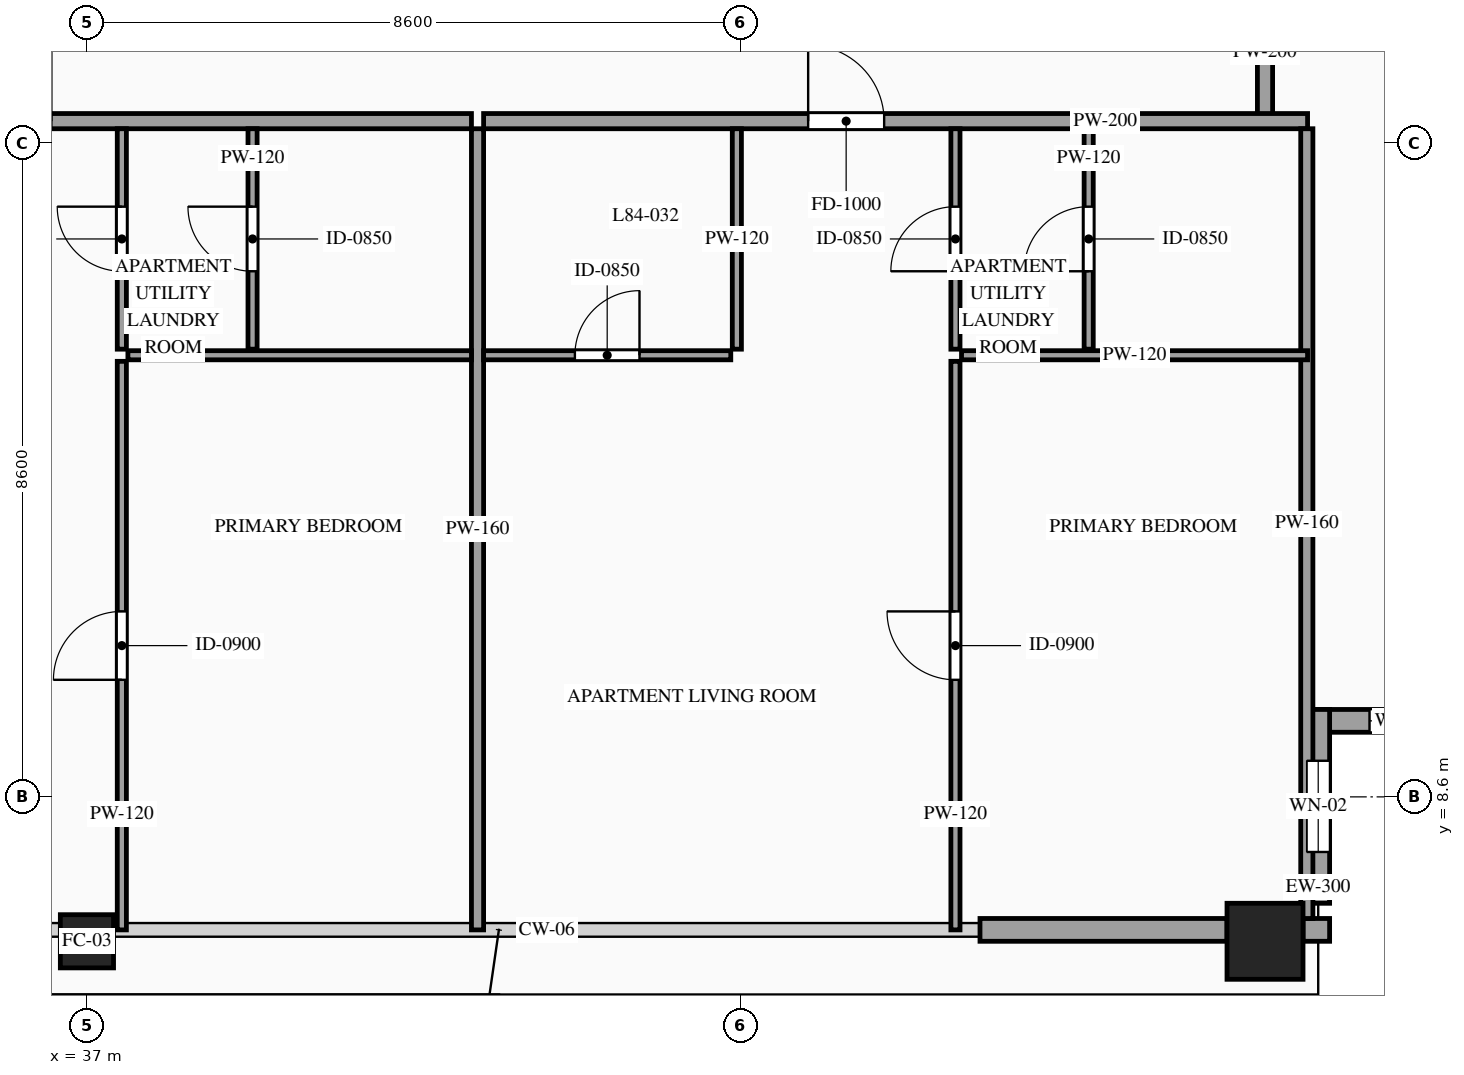
"""IFC4 building model, lengths in metres.
Left out: names, types, materials, properties, quantities, classifications, styles, units other than length and angle.
Written with IfcOpenShell. Run it as: python <this file> out.ifc"""

import sys

from ifc_helpers import new_model, si_unit, direction, frame, frame_2d, origin, origin_2d, place, context, subcontext, project, spatial, rectangle, hollow_rectangle, extrude, source, transform, mapped, element, fill, save


model = new_model("IFC4")
c1 = context("Model", 3, precision=1e-05, world=origin(), true_north=direction((0.0, 1.0)))
c2 = subcontext(c1, "Body", "Model", "MODEL_VIEW")
j1 = project(units=[si_unit("LENGTHUNIT", "METRE"), si_unit("PLANEANGLEUNIT", "RADIAN")], contexts=[c1])
p1 = place(None, origin())
s1 = spatial("IfcSite", under=j1, at=p1, CompositionType="ELEMENT")
p2 = place(p1, origin())
s2 = spatial("IfcBuilding", under=s1, at=p2, CompositionType="ELEMENT")
p3 = place(p2, frame((0.0, 0.0, 314.7)))
s3 = spatial("IfcBuildingStorey", under=s2, at=p3, CompositionType="ELEMENT", Elevation=314.7)
m1 = source(origin(), c2, "Body", "SweptSolid", [
    extrude(hollow_rectangle(XDim=0.7, YDim=0.7, WallThickness=0.032, at=origin_2d()), origin(), (0.0, 0.0, 1.0), 3.5),
])
p4 = place(p3, frame((37.0, 6.7, 0.0), z_axis=(0.0, 0.0, 1.0), x_axis=(1.0, 0.0, 0.0)))
e1 = element("IfcColumn", 1, at=p4, inside=s3, PredefinedType="COLUMN", context=c2, shape_type="MappedRepresentation", body=[
    mapped(m1, transform((0.0, 0.0, 0.0), scale=1.0)),
])
m2 = source(origin(), c2, "Body", "SweptSolid", [
    extrude(hollow_rectangle(XDim=1.0, YDim=1.0, WallThickness=0.048, at=origin_2d()), origin(), (0.0, 0.0, 1.0), 3.5),
])
p5 = place(p3, frame((52.5, 6.7, 0.0), z_axis=(0.0, 0.0, 1.0), x_axis=(1.0, 0.0, 0.0)))
e2 = element("IfcColumn", 2, at=p5, inside=s3, PredefinedType="COLUMN", context=c2, shape_type="MappedRepresentation", body=[
    mapped(m2, transform((0.0, 0.0, 0.0), scale=1.0)),
])
p6 = place(p3, frame((53.05, 9.6, 0.0), z_axis=(0.0, 0.0, 1.0), x_axis=(1.0, 0.0, 0.0)))
e3 = element("IfcWall", 3, at=p6, inside=s3, PredefinedType="SOLIDWALL", context=c2, shape_type="SweptSolid", body=[
    extrude(rectangle(XDim=2.55, YDim=0.3, at=frame_2d((1.275, 0.0))), origin(), (0.0, 0.0, 1.0), 3.28),
])
p7 = place(p6, frame((0.825, 0.0, 0.85)))
e4 = element("IfcOpeningElement", 4, at=p7, cuts=e3, PredefinedType="OPENING", context=c2, shape_type="SweptSolid", body=[
    extrude(rectangle(XDim=0.9, YDim=1.5, at=frame_2d((0.45, 0.75))), frame((0.0, 0.165, 0.0), z_axis=(0.0, -1.0, 0.0), x_axis=(1.0, 0.0, 0.0)), (0.0, 0.0, 1.0), 0.33),
])
p8 = place(p3, frame((53.2, 7.2, 0.0), z_axis=(0.0, 0.0, 1.0), x_axis=(0.0, 1.0, 0.0)))
e5 = element("IfcWall", 5, at=p8, inside=s3, PredefinedType="SOLIDWALL", context=c2, shape_type="SweptSolid", body=[
    extrude(rectangle(XDim=2.55, YDim=0.3, at=frame_2d((1.275, 0.0))), origin(), (0.0, 0.0, 1.0), 3.28),
])
p9 = place(p8, frame((0.675, 0.0, 0.85)))
e6 = element("IfcOpeningElement", 6, at=p9, cuts=e5, PredefinedType="OPENING", context=c2, shape_type="SweptSolid", body=[
    extrude(rectangle(XDim=1.2, YDim=2.1, at=frame_2d((0.6, 1.05))), frame((0.0, 0.165, 0.0), z_axis=(0.0, -1.0, 0.0), x_axis=(1.0, 0.0, 0.0)), (0.0, 0.0, 1.0), 0.33),
])
m3 = source(origin(), c2, "Body", "SweptSolid", [
    extrude(rectangle(XDim=0.35, YDim=0.3, at=frame_2d((0.175, 0.0))), origin(), (0.0, 0.0, 1.0), 3.28),
])
p10 = place(p3, frame((53.0, 6.85, 0.0), z_axis=(0.0, 0.0, 1.0), x_axis=(1.0, 0.0, 0.0)))
e7 = element("IfcWall", 7, at=p10, inside=s3, PredefinedType="SOLIDWALL", context=c2, shape_type="MappedRepresentation", body=[
    mapped(m3, transform((0.0, 0.0, 0.0), scale=1.0)),
])
m4 = source(origin(), c2, "Body", "SweptSolid", [
    extrude(rectangle(XDim=3.25, YDim=0.3, at=frame_2d((1.625, 0.0))), origin(), (0.0, 0.0, 1.0), 2.885),
])
p11 = place(p3, frame((48.75, 6.85, 0.0), z_axis=(0.0, 0.0, 1.0), x_axis=(1.0, 0.0, 0.0)))
e8 = element("IfcWall", 8, at=p11, inside=s3, PredefinedType="SOLIDWALL", context=c2, shape_type="MappedRepresentation", body=[
    mapped(m4, transform((0.0, 0.0, 0.0), scale=1.0)),
])
m5 = source(origin(), c2, "Body", "SweptSolid", [
    extrude(rectangle(XDim=1.7, YDim=0.2, at=frame_2d((0.85, 0.0))), origin(), (0.0, 0.0, 1.0), 3.28),
])
p12 = place(p3, frame((52.5, 17.55, 0.0), z_axis=(0.0, 0.0, 1.0), x_axis=(0.0, 1.0, 0.0)))
e9 = element("IfcWall", 9, at=p12, inside=s3, PredefinedType="PARTITIONING", context=c2, shape_type="MappedRepresentation", body=[
    mapped(m5, transform((0.0, 0.0, 0.0), scale=1.0)),
])
p13 = place(p3, frame((31.298, 17.49, 0.0), z_axis=(0.0, 0.0, 1.0), x_axis=(1.0, 0.0, 0.0)))
e10 = element("IfcWall", 10, at=p13, inside=s3, PredefinedType="PARTITIONING", context=c2, shape_type="SweptSolid", body=[
    extrude(rectangle(XDim=10.761, YDim=0.2, at=frame_2d((5.38, 0.0))), origin(), (0.0, 0.0, 1.0), 3.28),
])
p14 = place(p13, frame((4.234, 0.0, 0.0)))
e11 = element("IfcOpeningElement", 11, at=p14, cuts=e10, PredefinedType="OPENING", context=c2, shape_type="SweptSolid", body=[
    extrude(rectangle(XDim=1.0, YDim=2.2, at=frame_2d((0.5, 1.1))), frame((0.0, 0.115, 0.0), z_axis=(0.0, -1.0, 0.0), x_axis=(1.0, 0.0, 0.0)), (0.0, 0.0, 1.0), 0.23),
])
m6 = source(origin(), c2, "Body", "SweptSolid", [
    extrude(rectangle(XDim=10.54, YDim=0.16, at=frame_2d((5.27, 0.0))), origin(), (0.0, 0.0, 1.0), 3.28),
])
p15 = place(p3, frame((42.139, 6.85, 0.0), z_axis=(0.0, 0.0, 1.0), x_axis=(0.0, 1.0, 0.0)))
e12 = element("IfcWall", 12, at=p15, inside=s3, PredefinedType="PARTITIONING", context=c2, shape_type="MappedRepresentation", body=[
    mapped(m6, transform((0.0, 0.0, 0.0), scale=1.0)),
])
p16 = place(p3, frame((39.179, 14.49, 0.0), z_axis=(0.0, 0.0, 1.0), x_axis=(0.0, 1.0, 0.0)))
e13 = element("IfcWall", 13, at=p16, inside=s3, PredefinedType="PARTITIONING", context=c2, shape_type="SweptSolid", body=[
    extrude(rectangle(XDim=2.9, YDim=0.12, at=frame_2d((1.45, 0.0))), origin(), (0.0, 0.0, 1.0), 3.28),
])
p17 = place(p16, frame((1.025, 0.0, 0.0)))
e14 = element("IfcOpeningElement", 14, at=p17, cuts=e13, PredefinedType="OPENING", context=c2, shape_type="SweptSolid", body=[
    extrude(rectangle(XDim=0.85, YDim=2.1, at=frame_2d((0.425, 1.05))), frame((0.0, 0.075, 0.0), z_axis=(0.0, -1.0, 0.0), x_axis=(1.0, 0.0, 0.0)), (0.0, 0.0, 1.0), 0.15),
])
m7 = source(origin(), c2, "Body", "SweptSolid", [
    extrude(rectangle(XDim=4.52, YDim=0.12, at=frame_2d((2.26, 0.0))), origin(), (0.0, 0.0, 1.0), 3.28),
])
p18 = place(p3, frame((37.539, 14.41, 0.0), z_axis=(0.0, 0.0, 1.0), x_axis=(1.0, 0.0, 0.0)))
e15 = element("IfcWall", 15, at=p18, inside=s3, PredefinedType="PARTITIONING", context=c2, shape_type="MappedRepresentation", body=[
    mapped(m7, transform((0.0, 0.0, 0.0), scale=1.0)),
])
p19 = place(p3, frame((37.459, 6.85, 0.0), z_axis=(0.0, 0.0, 1.0), x_axis=(0.0, 1.0, 0.0)))
e16 = element("IfcWall", 16, at=p19, inside=s3, PredefinedType="PARTITIONING", context=c2, shape_type="SweptSolid", body=[
    extrude(rectangle(XDim=7.48, YDim=0.12, at=frame_2d((3.74, 0.0))), origin(), (0.0, 0.0, 1.0), 3.28),
])
p20 = place(p19, frame((3.29, 0.0, 0.0)))
e17 = element("IfcOpeningElement", 17, at=p20, cuts=e16, PredefinedType="OPENING", context=c2, shape_type="SweptSolid", body=[
    extrude(rectangle(XDim=0.9, YDim=2.15, at=frame_2d((0.45, 1.075))), frame((0.0, 0.075, 0.0), z_axis=(0.0, -1.0, 0.0), x_axis=(1.0, 0.0, 0.0)), (0.0, 0.0, 1.0), 0.15),
])
p21 = place(p3, frame((37.459, 14.49, 0.0), z_axis=(0.0, 0.0, 1.0), x_axis=(0.0, 1.0, 0.0)))
e18 = element("IfcWall", 18, at=p21, inside=s3, PredefinedType="PARTITIONING", context=c2, shape_type="SweptSolid", body=[
    extrude(rectangle(XDim=2.9, YDim=0.12, at=frame_2d((1.45, 0.0))), origin(), (0.0, 0.0, 1.0), 3.28),
])
p22 = place(p21, frame((1.025, 0.0, 0.0)))
e19 = element("IfcOpeningElement", 19, at=p22, cuts=e18, PredefinedType="OPENING", context=c2, shape_type="SweptSolid", body=[
    extrude(rectangle(XDim=0.85, YDim=2.1, at=frame_2d((0.425, 1.05))), frame((0.0, 0.075, 0.0), z_axis=(0.0, -1.0, 0.0), x_axis=(1.0, 0.0, 0.0)), (0.0, 0.0, 1.0), 0.15),
])
p23 = place(p3, frame((42.219, 17.49, 0.0), z_axis=(0.0, 0.0, 1.0), x_axis=(1.0, 0.0, 0.0)))
e20 = element("IfcWall", 20, at=p23, inside=s3, PredefinedType="PARTITIONING", context=c2, shape_type="SweptSolid", body=[
    extrude(rectangle(XDim=10.841, YDim=0.2, at=frame_2d((5.42, 0.0))), origin(), (0.0, 0.0, 1.0), 3.28),
])
p24 = place(p23, frame((4.27, 0.0, 0.0)))
e21 = element("IfcOpeningElement", 21, at=p24, cuts=e20, PredefinedType="OPENING", context=c2, shape_type="SweptSolid", body=[
    extrude(rectangle(XDim=1.0, YDim=2.2, at=frame_2d((0.5, 1.1))), frame((0.0, 0.115, 0.0), z_axis=(0.0, -1.0, 0.0), x_axis=(1.0, 0.0, 0.0)), (0.0, 0.0, 1.0), 0.23),
])
m8 = source(origin(), c2, "Body", "SweptSolid", [
    extrude(rectangle(XDim=10.39, YDim=0.16, at=frame_2d((5.195, 0.0))), origin(), (0.0, 0.0, 1.0), 3.28),
])
p25 = place(p3, frame((53.05, 7.0, 0.0), z_axis=(0.0, 0.0, 1.0), x_axis=(0.0, 1.0, 0.0)))
e22 = element("IfcWall", 22, at=p25, inside=s3, PredefinedType="PARTITIONING", context=c2, shape_type="MappedRepresentation", body=[
    mapped(m8, transform((0.0, 0.0, 0.0), scale=1.0)),
])
p26 = place(p3, frame((42.219, 14.41, 0.0), z_axis=(0.0, 0.0, 1.0), x_axis=(1.0, 0.0, 0.0)))
e23 = element("IfcWall", 23, at=p26, inside=s3, PredefinedType="PARTITIONING", context=c2, shape_type="SweptSolid", body=[
    extrude(rectangle(XDim=3.252, YDim=0.12, at=frame_2d((1.626, 0.0))), origin(), (0.0, 0.0, 1.0), 3.28),
])
p27 = place(p26, frame((1.201, 0.0, 0.0)))
e24 = element("IfcOpeningElement", 24, at=p27, cuts=e23, PredefinedType="OPENING", context=c2, shape_type="SweptSolid", body=[
    extrude(rectangle(XDim=0.85, YDim=2.1, at=frame_2d((0.425, 1.05))), frame((0.0, 0.075, 0.0), z_axis=(0.0, -1.0, 0.0), x_axis=(1.0, 0.0, 0.0)), (0.0, 0.0, 1.0), 0.15),
])
m9 = source(origin(), c2, "Body", "SweptSolid", [
    extrude(rectangle(XDim=2.9, YDim=0.12, at=frame_2d((1.45, 0.0))), origin(), (0.0, 0.0, 1.0), 3.28),
])
p28 = place(p3, frame((45.551, 14.49, 0.0), z_axis=(0.0, 0.0, 1.0), x_axis=(0.0, 1.0, 0.0)))
e25 = element("IfcWall", 25, at=p28, inside=s3, PredefinedType="PARTITIONING", context=c2, shape_type="MappedRepresentation", body=[
    mapped(m9, transform((0.0, 0.0, 0.0), scale=1.0)),
])
p29 = place(p3, frame((50.18, 14.49, 0.0), z_axis=(0.0, 0.0, 1.0), x_axis=(0.0, 1.0, 0.0)))
e26 = element("IfcWall", 26, at=p29, inside=s3, PredefinedType="PARTITIONING", context=c2, shape_type="SweptSolid", body=[
    extrude(rectangle(XDim=2.9, YDim=0.12, at=frame_2d((1.45, 0.0))), origin(), (0.0, 0.0, 1.0), 2.825),
])
p30 = place(p29, frame((1.025, 0.0, 0.0)))
e27 = element("IfcOpeningElement", 27, at=p30, cuts=e26, PredefinedType="OPENING", context=c2, shape_type="SweptSolid", body=[
    extrude(rectangle(XDim=0.85, YDim=2.1, at=frame_2d((0.425, 1.05))), frame((0.0, 0.075, 0.0), z_axis=(0.0, -1.0, 0.0), x_axis=(1.0, 0.0, 0.0)), (0.0, 0.0, 1.0), 0.15),
])
m10 = source(origin(), c2, "Body", "SweptSolid", [
    extrude(rectangle(XDim=4.553, YDim=0.12, at=frame_2d((2.276, 0.0))), origin(), (0.0, 0.0, 1.0), 3.28),
])
p31 = place(p3, frame((48.507, 14.41, 0.0), z_axis=(0.0, 0.0, 1.0), x_axis=(1.0, 0.0, 0.0)))
e28 = element("IfcWall", 28, at=p31, inside=s3, PredefinedType="PARTITIONING", context=c2, shape_type="MappedRepresentation", body=[
    mapped(m10, transform((0.0, 0.0, 0.0), scale=1.0)),
])
p32 = place(p3, frame((48.427, 6.85, 0.0), z_axis=(0.0, 0.0, 1.0), x_axis=(0.0, 1.0, 0.0)))
e29 = element("IfcWall", 29, at=p32, inside=s3, PredefinedType="PARTITIONING", context=c2, shape_type="SweptSolid", body=[
    extrude(rectangle(XDim=7.48, YDim=0.12, at=frame_2d((3.74, 0.0))), origin(), (0.0, 0.0, 1.0), 3.28),
])
p33 = place(p32, frame((3.29, 0.0, 0.0)))
e30 = element("IfcOpeningElement", 30, at=p33, cuts=e29, PredefinedType="OPENING", context=c2, shape_type="SweptSolid", body=[
    extrude(rectangle(XDim=0.9, YDim=2.15, at=frame_2d((0.45, 1.075))), frame((0.0, 0.075, 0.0), z_axis=(0.0, -1.0, 0.0), x_axis=(1.0, 0.0, 0.0)), (0.0, 0.0, 1.0), 0.15),
])
p34 = place(p3, frame((48.427, 14.49, 0.0), z_axis=(0.0, 0.0, 1.0), x_axis=(0.0, 1.0, 0.0)))
e31 = element("IfcWall", 31, at=p34, inside=s3, PredefinedType="PARTITIONING", context=c2, shape_type="SweptSolid", body=[
    extrude(rectangle(XDim=2.9, YDim=0.12, at=frame_2d((1.45, 0.0))), origin(), (0.0, 0.0, 1.0), 3.28),
])
p35 = place(p34, frame((1.025, 0.0, 0.0)))
e32 = element("IfcOpeningElement", 32, at=p35, cuts=e31, PredefinedType="OPENING", context=c2, shape_type="SweptSolid", body=[
    extrude(rectangle(XDim=0.85, YDim=2.1, at=frame_2d((0.425, 1.05))), frame((0.0, 0.075, 0.0), z_axis=(0.0, -1.0, 0.0), x_axis=(1.0, 0.0, 0.0)), (0.0, 0.0, 1.0), 0.15),
])
m11 = source(origin(), c2, "Body", "SweptSolid", [
    extrude(rectangle(XDim=0.9, YDim=1.5, at=frame_2d((0.45, 0.75))), frame((0.0, 0.03, 0.0), z_axis=(0.0, -1.0, 0.0), x_axis=(1.0, 0.0, 0.0)), (0.0, 0.0, 1.0), 0.06),
])
p36 = place(p7, origin())
e33 = element("IfcWindow", 33, at=p36, inside=s3, PartitioningType="SINGLE_PANEL", PredefinedType="WINDOW", context=c2, shape_type="MappedRepresentation", body=[
    mapped(m11, transform((0.0, 0.0, 0.0), scale=1.0)),
])
fill(e4, e33)
m12 = source(origin(), c2, "Body", "SweptSolid", [
    extrude(rectangle(XDim=1.2, YDim=2.1, at=frame_2d((0.6, 1.05))), frame((0.0, 0.03, 0.0), z_axis=(0.0, -1.0, 0.0), x_axis=(1.0, 0.0, 0.0)), (0.0, 0.0, 1.0), 0.06),
])
p37 = place(p9, origin())
e34 = element("IfcWindow", 34, at=p37, inside=s3, PartitioningType="SINGLE_PANEL", PredefinedType="WINDOW", context=c2, shape_type="MappedRepresentation", body=[
    mapped(m12, transform((0.0, 0.0, 0.0), scale=1.0)),
])
fill(e6, e34)
m13 = source(origin(), c2, "Body", "SweptSolid", [
    extrude(rectangle(XDim=0.85, YDim=2.1, at=frame_2d((0.425, 1.05))), frame((0.0, 0.025, 0.0), z_axis=(0.0, -1.0, 0.0), x_axis=(1.0, 0.0, 0.0)), (0.0, 0.0, 1.0), 0.05),
])
p38 = place(p17, origin())
e35 = element("IfcDoor", 35, at=p38, inside=s3, OperationType="SINGLE_SWING_RIGHT", PredefinedType="DOOR", context=c2, shape_type="MappedRepresentation", body=[
    mapped(m13, transform((0.0, 0.0, 0.0), scale=1.0)),
])
fill(e14, e35)
m14 = source(origin(), c2, "Body", "SweptSolid", [
    extrude(rectangle(XDim=0.9, YDim=2.15, at=frame_2d((0.45, 1.075))), frame((0.0, 0.025, 0.0), z_axis=(0.0, -1.0, 0.0), x_axis=(1.0, 0.0, 0.0)), (0.0, 0.0, 1.0), 0.05),
])
p39 = place(p20, origin())
e36 = element("IfcDoor", 36, at=p39, inside=s3, OperationType="SINGLE_SWING_LEFT", PredefinedType="DOOR", context=c2, shape_type="MappedRepresentation", body=[
    mapped(m14, transform((0.0, 0.0, 0.0), scale=1.0)),
])
fill(e17, e36)
p40 = place(p22, origin())
e37 = element("IfcDoor", 37, at=p40, inside=s3, OperationType="SINGLE_SWING_RIGHT", PredefinedType="DOOR", context=c2, shape_type="MappedRepresentation", body=[
    mapped(m13, transform((0.0, 0.0, 0.0), scale=1.0)),
])
fill(e19, e37)
m15 = source(origin(), c2, "Body", "SweptSolid", [
    extrude(rectangle(XDim=1.0, YDim=2.2, at=frame_2d((0.5, 1.1))), frame((0.0, 0.025, 0.0), z_axis=(0.0, -1.0, 0.0), x_axis=(1.0, 0.0, 0.0)), (0.0, 0.0, 1.0), 0.05),
])
p41 = place(p24, origin())
e38 = element("IfcDoor", 38, at=p41, inside=s3, OperationType="SINGLE_SWING_LEFT", PredefinedType="DOOR", context=c2, shape_type="MappedRepresentation", body=[
    mapped(m15, transform((0.0, 0.0, 0.0), scale=1.0)),
])
fill(e21, e38)
p42 = place(p27, origin())
e39 = element("IfcDoor", 39, at=p42, inside=s3, OperationType="SINGLE_SWING_RIGHT", PredefinedType="DOOR", context=c2, shape_type="MappedRepresentation", body=[
    mapped(m13, transform((0.0, 0.0, 0.0), scale=1.0)),
])
fill(e24, e39)
p43 = place(p30, origin())
e40 = element("IfcDoor", 40, at=p43, inside=s3, OperationType="SINGLE_SWING_LEFT", PredefinedType="DOOR", context=c2, shape_type="MappedRepresentation", body=[
    mapped(m13, transform((0.0, 0.0, 0.0), scale=1.0)),
])
fill(e27, e40)
p44 = place(p33, origin())
e41 = element("IfcDoor", 41, at=p44, inside=s3, OperationType="SINGLE_SWING_RIGHT", PredefinedType="DOOR", context=c2, shape_type="MappedRepresentation", body=[
    mapped(m14, transform((0.0, 0.0, 0.0), scale=1.0)),
])
fill(e30, e41)
p45 = place(p35, origin())
e42 = element("IfcDoor", 42, at=p45, inside=s3, OperationType="SINGLE_SWING_LEFT", PredefinedType="DOOR", context=c2, shape_type="MappedRepresentation", body=[
    mapped(m13, transform((0.0, 0.0, 0.0), scale=1.0)),
])
fill(e32, e42)
save(model, sys.argv[1])
